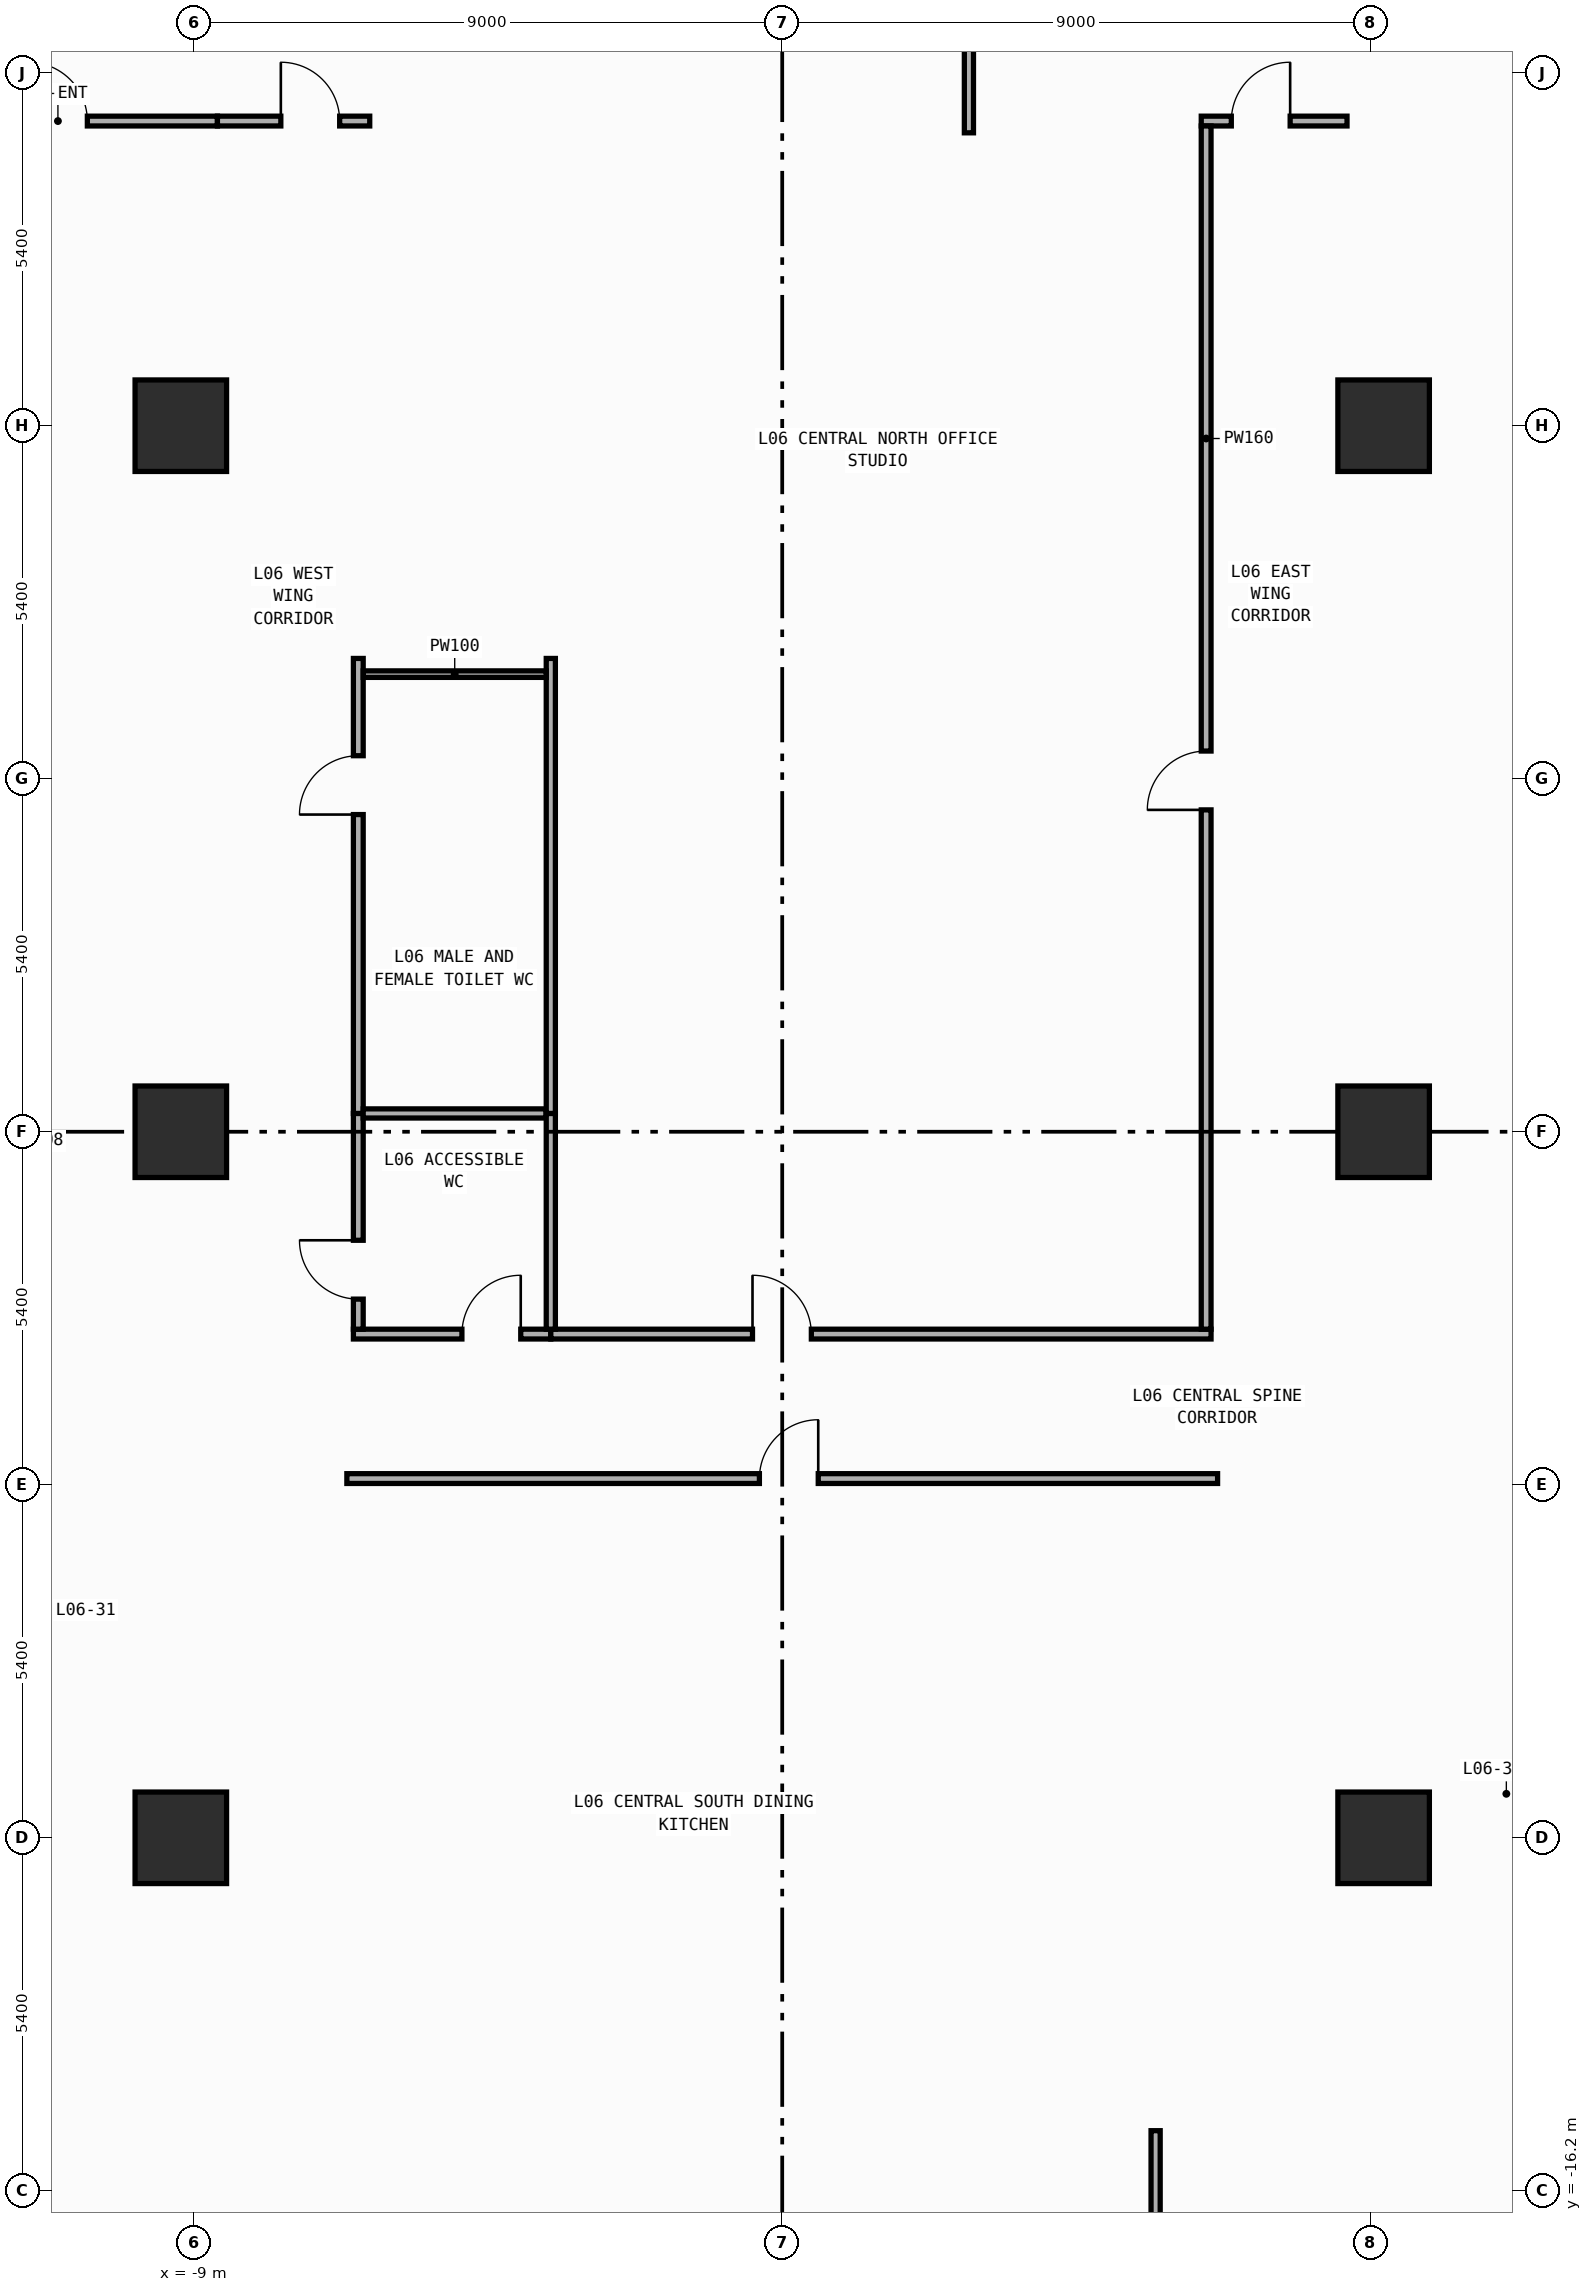
"""IFC4 building model, lengths in metres.
Left out: names, types, materials, properties, quantities, classifications, styles, units other than length and angle.
Written with IfcOpenShell. Run it as: python <this file> out.ifc"""

import sys

from ifc_helpers import new_model, si_unit, direction, frame, frame_2d, origin, origin_2d, place, context, subcontext, project, spatial, rectangle, extrude, element, fill, save


model = new_model("IFC4")
c1 = context("Model", 3, precision=1e-05, world=origin(), true_north=direction((0.0, 1.0)))
c2 = subcontext(c1, "Body", "Model", "MODEL_VIEW")
j1 = project(units=[si_unit("LENGTHUNIT", "METRE"), si_unit("PLANEANGLEUNIT", "RADIAN")], contexts=[c1])
p1 = place(None, origin())
s1 = spatial("IfcSite", under=j1, at=p1, CompositionType="ELEMENT")
p2 = place(p1, origin())
s2 = spatial("IfcBuilding", under=s1, at=p2, CompositionType="ELEMENT")
p3 = place(p2, frame((0.0, 0.0, 26.0)))
s3 = spatial("IfcBuildingStorey", under=s2, at=p3, CompositionType="ELEMENT", Elevation=26.0)
for number, where, z_axis, x_axis in (
    (1, (-9.2, -10.8, 0.0), (0.0, 0.0, 1.0), (1.0, 0.0, 0.0)),
    (2, (-9.2, 0.0, 0.0), (0.0, 0.0, 1.0), (1.0, 0.0, 0.0)),
    (3, (-9.2, 10.8, 0.0), (0.0, 0.0, 1.0), (1.0, 0.0, 0.0)),
    (4, (9.2, -10.8, 0.0), (0.0, 0.0, 1.0), (1.0, 0.0, 0.0)),
    (5, (9.2, 0.0, 0.0), (0.0, 0.0, 1.0), (1.0, 0.0, 0.0)),
    (6, (9.2, 10.8, 0.0), (0.0, 0.0, 1.0), (1.0, 0.0, 0.0)),
):
    element("IfcColumn", number, at=place(p3, frame(where, z_axis=z_axis, x_axis=x_axis)), inside=s3, PredefinedType="COLUMN", context=c2, shape_type="SweptSolid", body=[
        extrude(rectangle(XDim=1.4, YDim=1.4, at=origin_2d()), origin(), (0.0, 0.0, 1.0), 4.2),
    ])
p4 = place(p3, frame((-11.99, 15.46, 0.0), z_axis=(0.0, 0.0, 1.0), x_axis=(1.0, 0.0, 0.0)))
e7 = element("IfcWall", 7, at=p4, inside=s3, PredefinedType="PARTITIONING", context=c2, shape_type="SweptSolid", body=[
    extrude(rectangle(XDim=3.35, YDim=0.15, at=frame_2d((1.675, 0.0))), origin(), (0.0, 0.0, 1.0), 3.94),
])
p5 = place(p4, frame((0.46, 0.0, 0.0)))
e8 = element("IfcOpeningElement", 8, at=p5, cuts=e7, PredefinedType="OPENING", context=c2, shape_type="SweptSolid", body=[
    extrude(rectangle(XDim=0.9, YDim=2.15, at=frame_2d((0.45, 1.075))), frame((0.0, 0.085, 0.0), z_axis=(0.0, -1.0, 0.0), x_axis=(1.0, 0.0, 0.0)), (0.0, 0.0, 1.0), 0.17),
])
p6 = place(p3, frame((-6.56, -3.095, 0.0), z_axis=(0.0, 0.0, 1.0), x_axis=(1.0, 0.0, 0.0)))
e9 = element("IfcWall", 9, at=p6, inside=s3, PredefinedType="PARTITIONING", context=c2, shape_type="SweptSolid", body=[
    extrude(rectangle(XDim=3.02, YDim=0.15, at=frame_2d((1.51, 0.0))), origin(), (0.0, 0.0, 1.0), 3.94),
])
p7 = place(p6, frame((1.66, 0.0, 0.0)))
e10 = element("IfcOpeningElement", 10, at=p7, cuts=e9, PredefinedType="OPENING", context=c2, shape_type="SweptSolid", body=[
    extrude(rectangle(XDim=0.9, YDim=2.15, at=frame_2d((0.45, 1.075))), frame((0.0, 0.085, 0.0), z_axis=(0.0, -1.0, 0.0), x_axis=(1.0, 0.0, 0.0)), (0.0, 0.0, 1.0), 0.17),
])
p8 = place(p3, frame((-3.54, -3.095, 0.0), z_axis=(0.0, 0.0, 1.0), x_axis=(1.0, 0.0, 0.0)))
e11 = element("IfcWall", 11, at=p8, inside=s3, PredefinedType="PARTITIONING", context=c2, shape_type="SweptSolid", body=[
    extrude(rectangle(XDim=10.1, YDim=0.15, at=frame_2d((5.05, 0.0))), origin(), (0.0, 0.0, 1.0), 3.94),
])
p9 = place(p8, frame((3.085, 0.0, 0.0)))
e12 = element("IfcOpeningElement", 12, at=p9, cuts=e11, PredefinedType="OPENING", context=c2, shape_type="SweptSolid", body=[
    extrude(rectangle(XDim=0.9, YDim=2.15, at=frame_2d((0.45, 1.075))), frame((0.0, 0.085, 0.0), z_axis=(0.0, -1.0, 0.0), x_axis=(1.0, 0.0, 0.0)), (0.0, 0.0, 1.0), 0.17),
])
p10 = place(p3, frame((-6.66, -5.305, 0.0), z_axis=(0.0, 0.0, 1.0), x_axis=(1.0, 0.0, 0.0)))
e13 = element("IfcWall", 13, at=p10, inside=s3, PredefinedType="PARTITIONING", context=c2, shape_type="SweptSolid", body=[
    extrude(rectangle(XDim=13.32, YDim=0.15, at=frame_2d((6.66, 0.0))), origin(), (0.0, 0.0, 1.0), 3.94),
])
p11 = place(p10, frame((6.311, 0.0, 0.0)))
e14 = element("IfcOpeningElement", 14, at=p11, cuts=e13, PredefinedType="OPENING", context=c2, shape_type="SweptSolid", body=[
    extrude(rectangle(XDim=0.9, YDim=2.15, at=frame_2d((0.45, 1.075))), frame((0.0, 0.085, 0.0), z_axis=(0.0, -1.0, 0.0), x_axis=(1.0, 0.0, 0.0)), (0.0, 0.0, 1.0), 0.17),
])
p12 = place(p3, frame((-8.64, 15.46, 0.0), z_axis=(0.0, 0.0, 1.0), x_axis=(1.0, 0.0, 0.0)))
e15 = element("IfcWall", 15, at=p12, inside=s3, PredefinedType="PARTITIONING", context=c2, shape_type="SweptSolid", body=[
    extrude(rectangle(XDim=2.33, YDim=0.15, at=frame_2d((1.165, 0.0))), origin(), (0.0, 0.0, 1.0), 3.94),
])
p13 = place(p12, frame((0.97, 0.0, 0.0)))
e16 = element("IfcOpeningElement", 16, at=p13, cuts=e15, PredefinedType="OPENING", context=c2, shape_type="SweptSolid", body=[
    extrude(rectangle(XDim=0.9, YDim=2.15, at=frame_2d((0.45, 1.075))), frame((0.0, 0.085, 0.0), z_axis=(0.0, -1.0, 0.0), x_axis=(1.0, 0.0, 0.0)), (0.0, 0.0, 1.0), 0.17),
])
p14 = place(p3, frame((-6.485, -3.02, 0.0), z_axis=(0.0, 0.0, 1.0), x_axis=(0.0, 1.0, 0.0)))
e17 = element("IfcWall", 17, at=p14, inside=s3, PredefinedType="PARTITIONING", context=c2, shape_type="SweptSolid", body=[
    extrude(rectangle(XDim=3.3, YDim=0.15, at=frame_2d((1.65, 0.0))), origin(), (0.0, 0.0, 1.0), 3.94),
])
p15 = place(p14, frame((0.46, 0.0, 0.0)))
e18 = element("IfcOpeningElement", 18, at=p15, cuts=e17, PredefinedType="OPENING", context=c2, shape_type="SweptSolid", body=[
    extrude(rectangle(XDim=0.9, YDim=2.15, at=frame_2d((0.45, 1.075))), frame((0.0, 0.085, 0.0), z_axis=(0.0, -1.0, 0.0), x_axis=(1.0, 0.0, 0.0)), (0.0, 0.0, 1.0), 0.17),
])
p16 = place(p3, frame((-6.485, 0.28, 0.0), z_axis=(0.0, 0.0, 1.0), x_axis=(0.0, 1.0, 0.0)))
e19 = element("IfcWall", 19, at=p16, inside=s3, PredefinedType="PARTITIONING", context=c2, shape_type="SweptSolid", body=[
    extrude(rectangle(XDim=6.96, YDim=0.15, at=frame_2d((3.48, 0.0))), origin(), (0.0, 0.0, 1.0), 3.94),
])
p17 = place(p16, frame((4.572, 0.0, 0.0)))
e20 = element("IfcOpeningElement", 20, at=p17, cuts=e19, PredefinedType="OPENING", context=c2, shape_type="SweptSolid", body=[
    extrude(rectangle(XDim=0.9, YDim=2.15, at=frame_2d((0.45, 1.075))), frame((0.0, 0.085, 0.0), z_axis=(0.0, -1.0, 0.0), x_axis=(1.0, 0.0, 0.0)), (0.0, 0.0, 1.0), 0.17),
])
p18 = place(p3, frame((6.41, 15.46, 0.0), z_axis=(0.0, 0.0, 1.0), x_axis=(1.0, 0.0, 0.0)))
e21 = element("IfcWall", 21, at=p18, inside=s3, PredefinedType="PARTITIONING", context=c2, shape_type="SweptSolid", body=[
    extrude(rectangle(XDim=2.23, YDim=0.15, at=frame_2d((1.115, 0.0))), origin(), (0.0, 0.0, 1.0), 3.94),
])
p19 = place(p18, frame((0.46, 0.0, 0.0)))
e22 = element("IfcOpeningElement", 22, at=p19, cuts=e21, PredefinedType="OPENING", context=c2, shape_type="SweptSolid", body=[
    extrude(rectangle(XDim=0.9, YDim=2.15, at=frame_2d((0.45, 1.075))), frame((0.0, 0.085, 0.0), z_axis=(0.0, -1.0, 0.0), x_axis=(1.0, 0.0, 0.0)), (0.0, 0.0, 1.0), 0.17),
])
p20 = place(p3, frame((6.485, -3.02, 0.0), z_axis=(0.0, 0.0, 1.0), x_axis=(0.0, 1.0, 0.0)))
e23 = element("IfcWall", 23, at=p20, inside=s3, PredefinedType="PARTITIONING", context=c2, shape_type="SweptSolid", body=[
    extrude(rectangle(XDim=18.405, YDim=0.15, at=frame_2d((9.203, 0.0))), origin(), (0.0, 0.0, 1.0), 3.94),
])
p21 = place(p20, frame((7.944, 0.0, 0.0)))
e24 = element("IfcOpeningElement", 24, at=p21, cuts=e23, PredefinedType="OPENING", context=c2, shape_type="SweptSolid", body=[
    extrude(rectangle(XDim=0.9, YDim=2.15, at=frame_2d((0.45, 1.075))), frame((0.0, 0.085, 0.0), z_axis=(0.0, -1.0, 0.0), x_axis=(1.0, 0.0, 0.0)), (0.0, 0.0, 1.0), 0.17),
])
p22 = place(p3, frame((2.856, 15.28, 0.0), z_axis=(0.0, 0.0, 1.0), x_axis=(0.0, 1.0, 0.0)))
e25 = element("IfcWall", 25, at=p22, inside=s3, PredefinedType="PARTITIONING", context=c2, shape_type="SweptSolid", body=[
    extrude(rectangle(XDim=11.575, YDim=0.14, at=frame_2d((5.788, 0.0))), origin(), (0.0, 0.0, 1.0), 3.94),
])
p23 = place(p3, frame((5.712, -26.737, 0.0), z_axis=(0.0, 0.0, 1.0), x_axis=(0.0, 1.0, 0.0)))
e26 = element("IfcWall", 26, at=p23, inside=s3, PredefinedType="PARTITIONING", context=c2, shape_type="SweptSolid", body=[
    extrude(rectangle(XDim=11.457, YDim=0.14, at=frame_2d((5.729, 0.0))), origin(), (0.0, 0.0, 1.0), 3.94),
])
p24 = place(p23, frame((0.46, 0.0, 0.0)))
e27 = element("IfcOpeningElement", 27, at=p24, cuts=e26, PredefinedType="OPENING", context=c2, shape_type="SweptSolid", body=[
    extrude(rectangle(XDim=0.85, YDim=2.1, at=frame_2d((0.425, 1.05))), frame((0.0, 0.08, 0.0), z_axis=(0.0, -1.0, 0.0), x_axis=(1.0, 0.0, 0.0)), (0.0, 0.0, 1.0), 0.16),
])
p25 = place(p3, frame((-6.41, 0.28, 0.0), z_axis=(0.0, 0.0, 1.0), x_axis=(1.0, 0.0, 0.0)))
e28 = element("IfcWall", 28, at=p25, inside=s3, PredefinedType="PARTITIONING", context=c2, shape_type="SweptSolid", body=[
    extrude(rectangle(XDim=2.8, YDim=0.14, at=frame_2d((1.4, 0.0))), origin(), (0.0, 0.0, 1.0), 3.14),
])
p26 = place(p3, frame((-3.54, -3.02, 0.0), z_axis=(0.0, 0.0, 1.0), x_axis=(0.0, 1.0, 0.0)))
e29 = element("IfcWall", 29, at=p26, inside=s3, PredefinedType="PARTITIONING", context=c2, shape_type="SweptSolid", body=[
    extrude(rectangle(XDim=3.3, YDim=0.14, at=frame_2d((1.65, 0.0))), origin(), (0.0, 0.0, 1.0), 3.94),
])
p27 = place(p3, frame((-3.54, 0.28, 0.0), z_axis=(0.0, 0.0, 1.0), x_axis=(0.0, 1.0, 0.0)))
e30 = element("IfcWall", 30, at=p27, inside=s3, PredefinedType="PARTITIONING", context=c2, shape_type="SweptSolid", body=[
    extrude(rectangle(XDim=6.96, YDim=0.14, at=frame_2d((3.48, 0.0))), origin(), (0.0, 0.0, 1.0), 3.94),
])
p28 = place(p3, frame((-6.41, 7.0, 0.0), z_axis=(0.0, 0.0, 1.0), x_axis=(1.0, 0.0, 0.0)))
e31 = element("IfcWall", 31, at=p28, inside=s3, PredefinedType="PARTITIONING", context=c2, shape_type="SweptSolid", body=[
    extrude(rectangle(XDim=2.8, YDim=0.1, at=frame_2d((1.4, 0.0))), origin(), (0.0, 0.0, 1.0), 3.94),
])
p29 = place(p5, origin())
e32 = element("IfcDoor", 32, at=p29, inside=s3, OperationType="SINGLE_SWING_LEFT", PredefinedType="DOOR", context=c2, shape_type="SweptSolid", body=[
    extrude(rectangle(XDim=0.9, YDim=2.15, at=frame_2d((0.45, 1.075))), frame((0.0, 0.025, 0.0), z_axis=(0.0, -1.0, 0.0), x_axis=(1.0, 0.0, 0.0)), (0.0, 0.0, 1.0), 0.05),
])
fill(e8, e32)
p30 = place(p7, origin())
e33 = element("IfcDoor", 33, at=p30, inside=s3, OperationType="SINGLE_SWING_RIGHT", PredefinedType="DOOR", context=c2, shape_type="SweptSolid", body=[
    extrude(rectangle(XDim=0.9, YDim=2.15, at=frame_2d((0.45, 1.075))), frame((0.0, 0.025, 0.0), z_axis=(0.0, -1.0, 0.0), x_axis=(1.0, 0.0, 0.0)), (0.0, 0.0, 1.0), 0.05),
])
fill(e10, e33)
p31 = place(p9, origin())
e34 = element("IfcDoor", 34, at=p31, inside=s3, OperationType="SINGLE_SWING_LEFT", PredefinedType="DOOR", context=c2, shape_type="SweptSolid", body=[
    extrude(rectangle(XDim=0.9, YDim=2.15, at=frame_2d((0.45, 1.075))), frame((0.0, 0.025, 0.0), z_axis=(0.0, -1.0, 0.0), x_axis=(1.0, 0.0, 0.0)), (0.0, 0.0, 1.0), 0.05),
])
fill(e12, e34)
p32 = place(p11, origin())
e35 = element("IfcDoor", 35, at=p32, inside=s3, OperationType="SINGLE_SWING_RIGHT", PredefinedType="DOOR", context=c2, shape_type="SweptSolid", body=[
    extrude(rectangle(XDim=0.9, YDim=2.15, at=frame_2d((0.45, 1.075))), frame((0.0, 0.025, 0.0), z_axis=(0.0, -1.0, 0.0), x_axis=(1.0, 0.0, 0.0)), (0.0, 0.0, 1.0), 0.05),
])
fill(e14, e35)
p33 = place(p13, origin())
e36 = element("IfcDoor", 36, at=p33, inside=s3, OperationType="SINGLE_SWING_LEFT", PredefinedType="DOOR", context=c2, shape_type="SweptSolid", body=[
    extrude(rectangle(XDim=0.9, YDim=2.15, at=frame_2d((0.45, 1.075))), frame((0.0, 0.025, 0.0), z_axis=(0.0, -1.0, 0.0), x_axis=(1.0, 0.0, 0.0)), (0.0, 0.0, 1.0), 0.05),
])
fill(e16, e36)
p34 = place(p15, origin())
e37 = element("IfcDoor", 37, at=p34, inside=s3, OperationType="SINGLE_SWING_RIGHT", PredefinedType="DOOR", context=c2, shape_type="SweptSolid", body=[
    extrude(rectangle(XDim=0.9, YDim=2.15, at=frame_2d((0.45, 1.075))), frame((0.0, 0.025, 0.0), z_axis=(0.0, -1.0, 0.0), x_axis=(1.0, 0.0, 0.0)), (0.0, 0.0, 1.0), 0.05),
])
fill(e18, e37)
p35 = place(p17, origin())
e38 = element("IfcDoor", 38, at=p35, inside=s3, OperationType="SINGLE_SWING_LEFT", PredefinedType="DOOR", context=c2, shape_type="SweptSolid", body=[
    extrude(rectangle(XDim=0.9, YDim=2.15, at=frame_2d((0.45, 1.075))), frame((0.0, 0.025, 0.0), z_axis=(0.0, -1.0, 0.0), x_axis=(1.0, 0.0, 0.0)), (0.0, 0.0, 1.0), 0.05),
])
fill(e20, e38)
p36 = place(p19, origin())
e39 = element("IfcDoor", 39, at=p36, inside=s3, OperationType="SINGLE_SWING_RIGHT", PredefinedType="DOOR", context=c2, shape_type="SweptSolid", body=[
    extrude(rectangle(XDim=0.9, YDim=2.15, at=frame_2d((0.45, 1.075))), frame((0.0, 0.025, 0.0), z_axis=(0.0, -1.0, 0.0), x_axis=(1.0, 0.0, 0.0)), (0.0, 0.0, 1.0), 0.05),
])
fill(e22, e39)
p37 = place(p21, origin())
e40 = element("IfcDoor", 40, at=p37, inside=s3, OperationType="SINGLE_SWING_LEFT", PredefinedType="DOOR", context=c2, shape_type="SweptSolid", body=[
    extrude(rectangle(XDim=0.9, YDim=2.15, at=frame_2d((0.45, 1.075))), frame((0.0, 0.025, 0.0), z_axis=(0.0, -1.0, 0.0), x_axis=(1.0, 0.0, 0.0)), (0.0, 0.0, 1.0), 0.05),
])
fill(e24, e40)
save(model, sys.argv[1])
